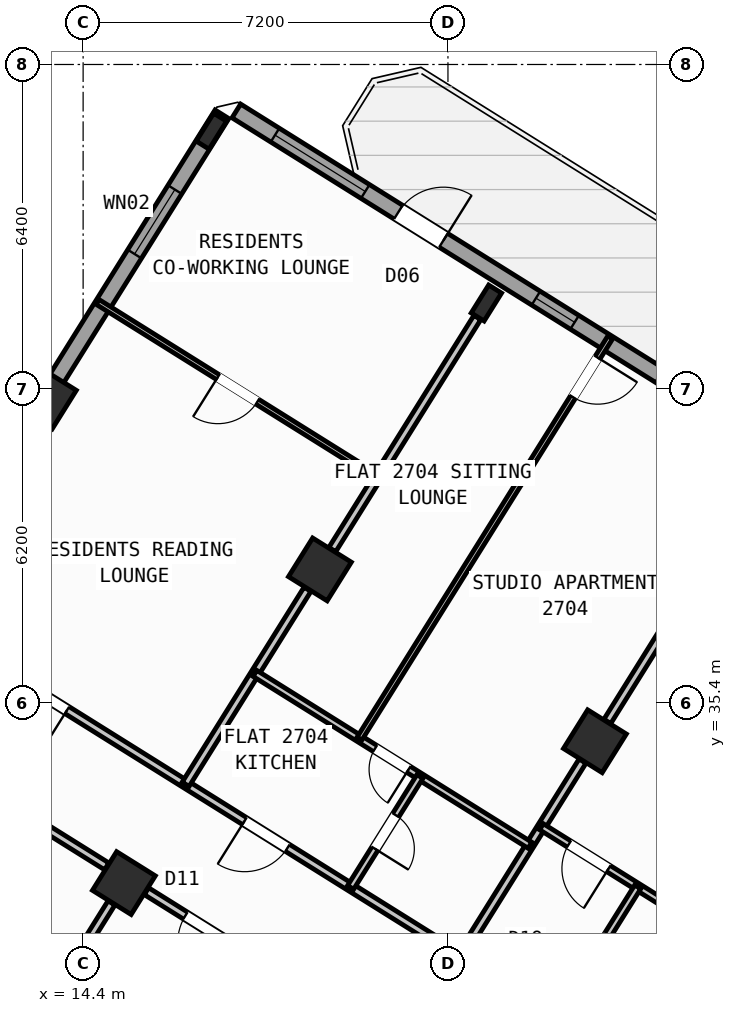
"""IFC4 building model, lengths in metres.
Left out: names, types, materials, properties, quantities, classifications, styles, units other than length and angle.
Written with IfcOpenShell. Run it as: python <this file> out.ifc"""

import sys

from ifc_helpers import new_model, si_unit, direction, frame, frame_2d, origin, origin_2d, place, context, subcontext, project, spatial, rectangle, hollow_rectangle, i_section, extrude, source, transform, mapped, element, fill, save


model = new_model("IFC4")
c1 = context("Model", 3, precision=1e-05, world=origin(), true_north=direction((0.0, 1.0)))
c2 = subcontext(c1, "Body", "Model", "MODEL_VIEW")
j1 = project(units=[si_unit("LENGTHUNIT", "METRE"), si_unit("PLANEANGLEUNIT", "RADIAN")], contexts=[c1])
p1 = place(None, origin())
s1 = spatial("IfcSite", under=j1, at=p1, CompositionType="ELEMENT")
p2 = place(p1, origin())
s2 = spatial("IfcBuilding", under=s1, at=p2, CompositionType="ELEMENT")
p3 = place(p2, frame((0.0, 0.0, 108.9)))
s3 = spatial("IfcBuildingStorey", under=s2, at=p3, CompositionType="ELEMENT", Elevation=108.9)
m1 = source(origin(), c2, "Body", "SweptSolid", [
    extrude(hollow_rectangle(XDim=0.9, YDim=0.9, WallThickness=0.036, at=origin_2d()), origin(), (0.0, 0.0, 1.0), 3.6),
])
p4 = place(p3, frame((24.5, 34.643, 0.0), z_axis=(0.0, 0.0, 1.0), x_axis=(-0.848048096156, 0.529919264233, 0.0)))
e1 = element("IfcColumn", 1, at=p4, inside=s3, PredefinedType="COLUMN", context=c2, shape_type="MappedRepresentation", body=[
    mapped(m1, transform((0.0, 0.0, 0.0), scale=1.0)),
])
m2 = source(origin(), c2, "Body", "SweptSolid", [
    extrude(i_section(OverallWidth=0.3, OverallDepth=0.65, WebThickness=0.016, FlangeThickness=0.031, at=origin_2d()), origin(), (0.0, 0.0, 1.0), 3.6),
])
p5 = place(p3, frame((22.358, 43.292, 0.0), z_axis=(0.0, 0.0, 1.0), x_axis=(-0.848048096156, 0.529919264233, 0.0)))
e2 = element("IfcColumn", 2, at=p5, inside=s3, PredefinedType="COLUMN", context=c2, shape_type="MappedRepresentation", body=[
    mapped(m2, transform((0.0, 0.0, 0.0), scale=1.0)),
])
for number, where, z_axis, x_axis in (
    (3, (19.073, 38.034, 0.0), (0.0, 0.0, 1.0), (-0.848, 0.53, 0.0)),
    (4, (15.205, 31.844, 0.0), (0.0, 0.0, 1.0), (-0.848, 0.53, 0.0)),
):
    element("IfcColumn", number, at=place(p3, frame(where, z_axis=z_axis, x_axis=x_axis)), inside=s3, PredefinedType="COLUMN", context=c2, shape_type="MappedRepresentation", body=[
        mapped(m1, transform((0.0, 0.0, 0.0), scale=1.0)),
    ])
p6 = place(p3, frame((16.931, 46.684, 0.0), z_axis=(0.0, 0.0, 1.0), x_axis=(-0.848048096156, 0.529919264233, 0.0)))
e5 = element("IfcColumn", 5, at=p6, inside=s3, PredefinedType="COLUMN", context=c2, shape_type="MappedRepresentation", body=[
    mapped(m2, transform((0.0, 0.0, 0.0), scale=1.0)),
])
p7 = place(p3, frame((13.646, 41.426, 0.0), z_axis=(0.0, 0.0, 1.0), x_axis=(-0.848048096156, 0.529919264233, 0.0)))
e6 = element("IfcColumn", 6, at=p7, inside=s3, PredefinedType="COLUMN", context=c2, shape_type="MappedRepresentation", body=[
    mapped(m1, transform((0.0, 0.0, 0.0), scale=1.0)),
])
p8 = place(p3, frame((5.7, 28.71, 0.0), z_axis=(0.0, 0.0, 1.0), x_axis=(0.529923711467, 0.8480453172, 0.0)))
e7 = element("IfcWall", 7, at=p8, inside=s3, PredefinedType="STANDARD", context=c2, shape_type="SweptSolid", body=[
    extrude(rectangle(XDim=21.587, YDim=0.32, at=frame_2d((10.794, 0.0))), origin(), (0.0, 0.0, 1.0), 2.775),
])
p9 = place(p8, frame((1.984, 0.0, 0.8)))
e8 = element("IfcOpeningElement", 8, at=p9, cuts=e7, PredefinedType="OPENING", context=c2, shape_type="SweptSolid", body=[
    extrude(rectangle(XDim=2.1, YDim=1.55, at=frame_2d((1.05, 0.775))), frame((0.0, 0.17, 0.0), z_axis=(0.0, -1.0, 0.0), x_axis=(1.0, 0.0, 0.0)), (0.0, 0.0, 1.0), 0.34),
])
p10 = place(p8, frame((11.459, 0.0, 0.85)))
e9 = element("IfcOpeningElement", 9, at=p10, cuts=e7, PredefinedType="OPENING", context=c2, shape_type="SweptSolid", body=[
    extrude(rectangle(XDim=1.8, YDim=1.5, at=frame_2d((0.9, 0.75))), frame((0.0, 0.17, 0.0), z_axis=(0.0, -1.0, 0.0), x_axis=(1.0, 0.0, 0.0)), (0.0, 0.0, 1.0), 0.34),
])
p11 = place(p8, frame((18.335, 0.0, 0.85)))
e10 = element("IfcOpeningElement", 10, at=p11, cuts=e7, PredefinedType="OPENING", context=c2, shape_type="SweptSolid", body=[
    extrude(rectangle(XDim=1.5, YDim=1.5, at=frame_2d((0.75, 0.75))), frame((0.0, 0.17, 0.0), z_axis=(0.0, -1.0, 0.0), x_axis=(1.0, 0.0, 0.0)), (0.0, 0.0, 1.0), 0.34),
])
p12 = place(p3, frame((17.424, 47.083, 0.0), z_axis=(0.0, 0.0, 1.0), x_axis=(0.848049927979, -0.529916332693, 0.0)))
e11 = element("IfcWall", 11, at=p12, inside=s3, PredefinedType="STANDARD", context=c2, shape_type="SweptSolid", body=[
    extrude(rectangle(XDim=29.223, YDim=0.32, at=frame_2d((14.612, 0.0))), origin(), (0.0, 0.0, 1.0), 3.35),
])
p13 = place(p12, frame((3.77, 0.0, 0.0)))
e12 = element("IfcOpeningElement", 12, at=p13, cuts=e11, PredefinedType="OPENING", context=c2, shape_type="SweptSolid", body=[
    extrude(rectangle(XDim=1.05, YDim=2.15, at=frame_2d((0.525, 1.075))), frame((0.0, 0.17, 0.0), z_axis=(0.0, -1.0, 0.0), x_axis=(1.0, 0.0, 0.0)), (0.0, 0.0, 1.0), 0.34),
])
p14 = place(p12, frame((0.9, 0.0, 0.8)))
e13 = element("IfcOpeningElement", 13, at=p14, cuts=e11, PredefinedType="OPENING", context=c2, shape_type="SweptSolid", body=[
    extrude(rectangle(XDim=2.1, YDim=1.55, at=frame_2d((1.05, 0.775))), frame((0.0, 0.17, 0.0), z_axis=(0.0, -1.0, 0.0), x_axis=(1.0, 0.0, 0.0)), (0.0, 0.0, 1.0), 0.34),
])
p15 = place(p12, frame((6.972, 0.0, 1.0)))
e14 = element("IfcOpeningElement", 14, at=p15, cuts=e11, PredefinedType="OPENING", context=c2, shape_type="SweptSolid", body=[
    extrude(rectangle(XDim=0.9, YDim=1.25, at=frame_2d((0.45, 0.625))), frame((0.0, 0.17, 0.0), z_axis=(0.0, -1.0, 0.0), x_axis=(1.0, 0.0, 0.0)), (0.0, 0.0, 1.0), 0.34),
])
p16 = place(p12, frame((9.847, 0.0, 0.85)))
e15 = element("IfcOpeningElement", 15, at=p16, cuts=e11, PredefinedType="OPENING", context=c2, shape_type="SweptSolid", body=[
    extrude(rectangle(XDim=1.5, YDim=1.5, at=frame_2d((0.75, 0.75))), frame((0.0, 0.17, 0.0), z_axis=(0.0, -1.0, 0.0), x_axis=(1.0, 0.0, 0.0)), (0.0, 0.0, 1.0), 0.34),
])
p17 = place(p12, frame((13.889, 0.0, 0.95)))
e16 = element("IfcOpeningElement", 16, at=p17, cuts=e11, PredefinedType="OPENING", context=c2, shape_type="SweptSolid", body=[
    extrude(rectangle(XDim=1.2, YDim=1.4, at=frame_2d((0.6, 0.7))), frame((0.0, 0.17, 0.0), z_axis=(0.0, -1.0, 0.0), x_axis=(1.0, 0.0, 0.0)), (0.0, 0.0, 1.0), 0.34),
])
p18 = place(p12, frame((17.254, 0.0, 1.0)))
e17 = element("IfcOpeningElement", 17, at=p18, cuts=e11, PredefinedType="OPENING", context=c2, shape_type="SweptSolid", body=[
    extrude(rectangle(XDim=0.9, YDim=1.25, at=frame_2d((0.45, 0.625))), frame((0.0, 0.17, 0.0), z_axis=(0.0, -1.0, 0.0), x_axis=(1.0, 0.0, 0.0)), (0.0, 0.0, 1.0), 0.34),
])
p19 = place(p12, frame((20.764, 0.0, 0.8)))
e18 = element("IfcOpeningElement", 18, at=p19, cuts=e11, PredefinedType="OPENING", context=c2, shape_type="SweptSolid", body=[
    extrude(rectangle(XDim=2.1, YDim=1.55, at=frame_2d((1.05, 0.775))), frame((0.0, 0.17, 0.0), z_axis=(0.0, -1.0, 0.0), x_axis=(1.0, 0.0, 0.0)), (0.0, 0.0, 1.0), 0.34),
])
p20 = place(p12, frame((25.403, 0.0, 0.8)))
e19 = element("IfcOpeningElement", 19, at=p20, cuts=e11, PredefinedType="OPENING", context=c2, shape_type="SweptSolid", body=[
    extrude(rectangle(XDim=2.1, YDim=1.55, at=frame_2d((1.05, 0.775))), frame((0.0, 0.17, 0.0), z_axis=(0.0, -1.0, 0.0), x_axis=(1.0, 0.0, 0.0)), (0.0, 0.0, 1.0), 0.34),
])
p21 = place(p3, frame((31.239, 38.274, 0.0), z_axis=(0.0, 0.0, 1.0), x_axis=(-0.529925472745, -0.848044216616, 0.0)))
e20 = element("IfcWall", 20, at=p21, inside=s3, PredefinedType="PARTITIONING", context=c2, shape_type="SweptSolid", body=[
    extrude(rectangle(XDim=11.65, YDim=0.16, at=frame_2d((5.825, 0.0))), origin(), (0.0, 0.0, 1.0), 3.34),
])
p22 = place(p3, frame((25.065, 28.394, 0.0), z_axis=(0.0, 0.0, 1.0), x_axis=(-0.848048310262, 0.529918921593, 0.0)))
e21 = element("IfcWall", 21, at=p22, inside=s3, PredefinedType="PARTITIONING", context=c2, shape_type="SweptSolid", body=[
    extrude(rectangle(XDim=16.73, YDim=0.16, at=frame_2d((8.365, 0.0))), origin(), (0.0, 0.0, 1.0), 3.34),
])
p23 = place(p22, frame((2.22, 0.0, 0.0)))
e22 = element("IfcOpeningElement", 22, at=p23, cuts=e21, PredefinedType="OPENING", context=c2, shape_type="SweptSolid", body=[
    extrude(rectangle(XDim=0.86, YDim=2.05, at=frame_2d((0.43, 1.025))), frame((0.0, 0.09, 0.0), z_axis=(0.0, -1.0, 0.0), x_axis=(1.0, 0.0, 0.0)), (0.0, 0.0, 1.0), 0.18),
])
p24 = place(p22, frame((7.82, 0.0, 0.0)))
e23 = element("IfcOpeningElement", 23, at=p24, cuts=e21, PredefinedType="OPENING", context=c2, shape_type="SweptSolid", body=[
    extrude(rectangle(XDim=1.0, YDim=2.1, at=frame_2d((0.5, 1.05))), frame((0.0, 0.09, 0.0), z_axis=(0.0, -1.0, 0.0), x_axis=(1.0, 0.0, 0.0)), (0.0, 0.0, 1.0), 0.18),
])
p25 = place(p22, frame((12.95, 0.0, 0.0)))
e24 = element("IfcOpeningElement", 24, at=p25, cuts=e21, PredefinedType="OPENING", context=c2, shape_type="SweptSolid", body=[
    extrude(rectangle(XDim=1.0, YDim=2.1, at=frame_2d((0.5, 1.05))), frame((0.0, 0.09, 0.0), z_axis=(0.0, -1.0, 0.0), x_axis=(1.0, 0.0, 0.0)), (0.0, 0.0, 1.0), 0.18),
])
p26 = place(p3, frame((20.293, 28.782, 0.0), z_axis=(0.0, 0.0, 1.0), x_axis=(-0.848040881926, 0.529930809241, 0.0)))
e25 = element("IfcWall", 25, at=p26, inside=s3, PredefinedType="PARTITIONING", context=c2, shape_type="SweptSolid", body=[
    extrude(rectangle(XDim=5.476, YDim=0.16, at=frame_2d((2.738, 0.0))), origin(), (0.0, 0.0, 1.0), 2.775),
])
p27 = place(p26, frame((3.568, 0.0, 0.0)))
e26 = element("IfcOpeningElement", 26, at=p27, cuts=e25, PredefinedType="OPENING", context=c2, shape_type="SweptSolid", body=[
    extrude(rectangle(XDim=1.0, YDim=2.1, at=frame_2d((0.5, 1.05))), frame((0.0, 0.09, 0.0), z_axis=(0.0, -1.0, 0.0), x_axis=(1.0, 0.0, 0.0)), (0.0, 0.0, 1.0), 0.18),
])
p28 = place(p3, frame((14.866, 32.173, 0.0), z_axis=(0.0, 0.0, 1.0), x_axis=(-0.848053401719, 0.529910773464, 0.0)))
e27 = element("IfcWall", 27, at=p28, inside=s3, PredefinedType="PARTITIONING", context=c2, shape_type="SweptSolid", body=[
    extrude(rectangle(XDim=5.476, YDim=0.16, at=frame_2d((2.738, 0.0))), origin(), (0.0, 0.0, 1.0), 2.775),
])
p29 = place(p28, frame((4.108, 0.0, 0.0)))
e28 = element("IfcOpeningElement", 28, at=p29, cuts=e27, PredefinedType="OPENING", context=c2, shape_type="SweptSolid", body=[
    extrude(rectangle(XDim=1.0, YDim=2.1, at=frame_2d((0.5, 1.05))), frame((0.0, 0.09, 0.0), z_axis=(0.0, -1.0, 0.0), x_axis=(1.0, 0.0, 0.0)), (0.0, 0.0, 1.0), 0.18),
])
p30 = place(p3, frame((14.96, 31.452, 0.0), z_axis=(0.0, 0.0, 1.0), x_axis=(-0.529947310719, -0.848030570122, 0.0)))
e29 = element("IfcWall", 29, at=p30, inside=s3, PredefinedType="PARTITIONING", context=c2, shape_type="SweptSolid", body=[
    extrude(rectangle(XDim=6.376, YDim=0.16, at=frame_2d((3.188, 0.0))), origin(), (0.0, 0.0, 1.0), 2.775),
])
p31 = place(p3, frame((13.986, 29.893, 0.0), z_axis=(0.0, 0.0, 1.0), x_axis=(-0.848051346257, 0.52991406295, 0.0)))
e30 = element("IfcWall", 30, at=p31, inside=s3, PredefinedType="PLUMBINGWALL", context=c2, shape_type="SweptSolid", body=[
    extrude(rectangle(XDim=3.62, YDim=0.14, at=frame_2d((1.81, 0.0))), origin(), (0.0, 0.0, 1.0), 3.34),
])
p32 = place(p3, frame((27.607, 39.615, 0.0), z_axis=(0.0, 0.0, 1.0), x_axis=(-0.529913610495, -0.848051628978, 0.0)))
e31 = element("IfcWall", 31, at=p32, inside=s3, PredefinedType="PARTITIONING", context=c2, shape_type="SweptSolid", body=[
    extrude(rectangle(XDim=5.401, YDim=0.16, at=frame_2d((2.7, 0.0))), origin(), (0.0, 0.0, 1.0), 2.775),
])
p33 = place(p3, frame((24.256, 34.251, 0.0), z_axis=(0.0, 0.0, 1.0), x_axis=(-0.529926399231, -0.848043637673, 0.0)))
e32 = element("IfcWall", 32, at=p33, inside=s3, PredefinedType="PARTITIONING", context=c2, shape_type="SweptSolid", body=[
    extrude(rectangle(XDim=4.538, YDim=0.16, at=frame_2d((2.269, 0.0))), origin(), (0.0, 0.0, 1.0), 2.775),
])
p34 = place(p3, frame((26.66, 30.947, 0.0), z_axis=(0.0, 0.0, 1.0), x_axis=(-0.84803087207, 0.529946827537, 0.0)))
e33 = element("IfcWall", 33, at=p34, inside=s3, PredefinedType="PLUMBINGWALL", context=c2, shape_type="SweptSolid", body=[
    extrude(rectangle(XDim=3.79, YDim=0.14, at=frame_2d((1.895, 0.0))), origin(), (0.0, 0.0, 1.0), 3.34),
])
p35 = place(p34, frame((2.23, 0.0, 0.0)))
e34 = element("IfcOpeningElement", 34, at=p35, cuts=e33, PredefinedType="OPENING", context=c2, shape_type="SweptSolid", body=[
    extrude(rectangle(XDim=0.92, YDim=2.08, at=frame_2d((0.46, 1.04))), frame((0.0, 0.08, 0.0), z_axis=(0.0, -1.0, 0.0), x_axis=(1.0, 0.0, 0.0)), (0.0, 0.0, 1.0), 0.16),
])
p36 = place(p3, frame((25.345, 31.768, 0.0), z_axis=(0.0, 0.0, 1.0), x_axis=(-0.529882284462, -0.848071202561, 0.0)))
e35 = element("IfcWall", 35, at=p36, inside=s3, PredefinedType="PLUMBINGWALL", context=c2, shape_type="SweptSolid", body=[
    extrude(rectangle(XDim=3.01, YDim=0.14, at=frame_2d((1.505, 0.0))), origin(), (0.0, 0.0, 1.0), 2.995),
])
p37 = place(p36, frame((1.115, 0.0, 0.0)))
e36 = element("IfcOpeningElement", 36, at=p37, cuts=e35, PredefinedType="OPENING", context=c2, shape_type="SweptSolid", body=[
    extrude(rectangle(XDim=0.78, YDim=2.05, at=frame_2d((0.39, 1.025))), frame((0.0, 0.08, 0.0), z_axis=(0.0, -1.0, 0.0), x_axis=(1.0, 0.0, 0.0)), (0.0, 0.0, 1.0), 0.16),
])
p38 = place(p3, frame((22.18, 43.006, 0.0), z_axis=(0.0, 0.0, 1.0), x_axis=(-0.529913610495, -0.848051628978, 0.0)))
e37 = element("IfcWall", 37, at=p38, inside=s3, PredefinedType="PARTITIONING", context=c2, shape_type="SweptSolid", body=[
    extrude(rectangle(XDim=5.401, YDim=0.16, at=frame_2d((2.7, 0.0))), origin(), (0.0, 0.0, 1.0), 2.775),
])
p39 = place(p3, frame((18.828, 37.643, 0.0), z_axis=(0.0, 0.0, 1.0), x_axis=(-0.529926399231, -0.848043637673, 0.0)))
e38 = element("IfcWall", 38, at=p39, inside=s3, PredefinedType="PARTITIONING", context=c2, shape_type="SweptSolid", body=[
    extrude(rectangle(XDim=4.538, YDim=0.16, at=frame_2d((2.269, 0.0))), origin(), (0.0, 0.0, 1.0), 2.775),
])
p40 = place(p3, frame((23.218, 32.591, 0.0), z_axis=(0.0, 0.0, 1.0), x_axis=(-0.848056163074, 0.529906354247, 0.0)))
e39 = element("IfcWall", 39, at=p40, inside=s3, PredefinedType="PLUMBINGWALL", context=c2, shape_type="SweptSolid", body=[
    extrude(rectangle(XDim=6.4, YDim=0.14, at=frame_2d((3.2, 0.0))), origin(), (0.0, 0.0, 1.0), 3.34),
])
p41 = place(p40, frame((2.824, 0.0, 0.0)))
e40 = element("IfcOpeningElement", 40, at=p41, cuts=e39, PredefinedType="OPENING", context=c2, shape_type="SweptSolid", body=[
    extrude(rectangle(XDim=0.78, YDim=2.05, at=frame_2d((0.39, 1.025))), frame((0.0, 0.08, 0.0), z_axis=(0.0, -1.0, 0.0), x_axis=(1.0, 0.0, 0.0)), (0.0, 0.0, 1.0), 0.16),
])
p42 = place(p3, frame((21.047, 33.947, 0.0), z_axis=(0.0, 0.0, 1.0), x_axis=(-0.529913878929, -0.848051461244, 0.0)))
e41 = element("IfcWall", 41, at=p42, inside=s3, PredefinedType="PLUMBINGWALL", context=c2, shape_type="SweptSolid", body=[
    extrude(rectangle(XDim=2.58, YDim=0.14, at=frame_2d((1.29, 0.0))), origin(), (0.0, 0.0, 1.0), 3.34),
])
p43 = place(p42, frame((0.9, 0.0, 0.0)))
e42 = element("IfcOpeningElement", 42, at=p43, cuts=e41, PredefinedType="OPENING", context=c2, shape_type="SweptSolid", body=[
    extrude(rectangle(XDim=0.78, YDim=2.05, at=frame_2d((0.39, 1.025))), frame((0.0, 0.08, 0.0), z_axis=(0.0, -1.0, 0.0), x_axis=(1.0, 0.0, 0.0)), (0.0, 0.0, 1.0), 0.16),
])
p44 = place(p3, frame((24.802, 42.614, 0.0), z_axis=(0.0, 0.0, 1.0), x_axis=(-0.529926099889, -0.848043824727, 0.0)))
e43 = element("IfcWall", 43, at=p44, inside=s3, PredefinedType="PARTITIONING", context=c2, shape_type="SweptSolid", body=[
    extrude(rectangle(XDim=9.34, YDim=0.11, at=frame_2d((4.67, 0.0))), origin(), (0.0, 0.0, 1.0), 3.34),
])
p45 = place(p44, frame((0.47, 0.0, 0.0)))
e44 = element("IfcOpeningElement", 44, at=p45, cuts=e43, PredefinedType="OPENING", context=c2, shape_type="SweptSolid", body=[
    extrude(rectangle(XDim=0.92, YDim=2.08, at=frame_2d((0.46, 1.04))), frame((0.0, 0.065, 0.0), z_axis=(0.0, -1.0, 0.0), x_axis=(1.0, 0.0, 0.0)), (0.0, 0.0, 1.0), 0.13),
])
p46 = place(p3, frame((20.213, 39.859, 0.0), z_axis=(0.0, 0.0, 1.0), x_axis=(-0.848048787466, 0.529918157905, 0.0)))
e45 = element("IfcWall", 45, at=p46, inside=s3, PredefinedType="PARTITIONING", context=c2, shape_type="SweptSolid", body=[
    extrude(rectangle(XDim=6.52, YDim=0.11, at=frame_2d((3.26, 0.0))), origin(), (0.0, 0.0, 1.0), 3.34),
])
p47 = place(p46, frame((2.8, 0.0, 0.0)))
e46 = element("IfcOpeningElement", 46, at=p47, cuts=e45, PredefinedType="OPENING", context=c2, shape_type="SweptSolid", body=[
    extrude(rectangle(XDim=0.92, YDim=2.08, at=frame_2d((0.46, 1.04))), frame((0.0, 0.065, 0.0), z_axis=(0.0, -1.0, 0.0), x_axis=(1.0, 0.0, 0.0)), (0.0, 0.0, 1.0), 0.13),
])
m3 = source(origin(), c2, "Body", "SweptSolid", [
    extrude(rectangle(XDim=1.05, YDim=2.15, at=frame_2d((0.525, 1.075))), frame((0.0, 0.025, 0.0), z_axis=(0.0, -1.0, 0.0), x_axis=(1.0, 0.0, 0.0)), (0.0, 0.0, 1.0), 0.05),
])
p48 = place(p13, origin())
e47 = element("IfcDoor", 47, at=p48, inside=s3, OperationType="SINGLE_SWING_RIGHT", PredefinedType="DOOR", context=c2, shape_type="MappedRepresentation", body=[
    mapped(m3, transform((0.0, 0.0, 0.0), scale=1.0)),
])
fill(e12, e47)
m4 = source(origin(), c2, "Body", "SweptSolid", [
    extrude(rectangle(XDim=1.5, YDim=1.5, at=frame_2d((0.75, 0.75))), frame((0.0, 0.03, 0.0), z_axis=(0.0, -1.0, 0.0), x_axis=(1.0, 0.0, 0.0)), (0.0, 0.0, 1.0), 0.06),
])
p49 = place(p11, origin())
e48 = element("IfcWindow", 48, at=p49, inside=s3, PartitioningType="SINGLE_PANEL", PredefinedType="WINDOW", context=c2, shape_type="MappedRepresentation", body=[
    mapped(m4, transform((0.0, 0.0, 0.0), scale=1.0)),
])
fill(e10, e48)
m5 = source(origin(), c2, "Body", "SweptSolid", [
    extrude(rectangle(XDim=2.1, YDim=1.55, at=frame_2d((1.05, 0.775))), frame((0.0, 0.03, 0.0), z_axis=(0.0, -1.0, 0.0), x_axis=(1.0, 0.0, 0.0)), (0.0, 0.0, 1.0), 0.06),
])
p50 = place(p14, origin())
e49 = element("IfcWindow", 49, at=p50, inside=s3, PartitioningType="SINGLE_PANEL", PredefinedType="WINDOW", context=c2, shape_type="MappedRepresentation", body=[
    mapped(m5, transform((0.0, 0.0, 0.0), scale=1.0)),
])
fill(e13, e49)
m6 = source(origin(), c2, "Body", "SweptSolid", [
    extrude(rectangle(XDim=0.9, YDim=1.25, at=frame_2d((0.45, 0.625))), frame((0.0, 0.03, 0.0), z_axis=(0.0, -1.0, 0.0), x_axis=(1.0, 0.0, 0.0)), (0.0, 0.0, 1.0), 0.06),
])
p51 = place(p15, origin())
e50 = element("IfcWindow", 50, at=p51, inside=s3, PartitioningType="SINGLE_PANEL", PredefinedType="WINDOW", context=c2, shape_type="MappedRepresentation", body=[
    mapped(m6, transform((0.0, 0.0, 0.0), scale=1.0)),
])
fill(e14, e50)
m7 = source(origin(), c2, "Body", "SweptSolid", [
    extrude(rectangle(XDim=1.0, YDim=2.1, at=frame_2d((0.5, 1.05))), frame((0.0, 0.025, 0.0), z_axis=(0.0, -1.0, 0.0), x_axis=(1.0, 0.0, 0.0)), (0.0, 0.0, 1.0), 0.05),
])
p52 = place(p27, origin())
e51 = element("IfcDoor", 51, at=p52, inside=s3, OperationType="SINGLE_SWING_LEFT", PredefinedType="DOOR", context=c2, shape_type="MappedRepresentation", body=[
    mapped(m7, transform((0.0, 0.0, 0.0), scale=1.0)),
])
fill(e26, e51)
m8 = source(origin(), c2, "Body", "SweptSolid", [
    extrude(rectangle(XDim=0.92, YDim=2.08, at=frame_2d((0.46, 1.04))), frame((0.0, 0.025, 0.0), z_axis=(0.0, -1.0, 0.0), x_axis=(1.0, 0.0, 0.0)), (0.0, 0.0, 1.0), 0.05),
])
p53 = place(p35, origin())
e52 = element("IfcDoor", 52, at=p53, inside=s3, OperationType="SINGLE_SWING_LEFT", PredefinedType="DOOR", context=c2, shape_type="MappedRepresentation", body=[
    mapped(m8, transform((0.0, 0.0, 0.0), scale=1.0)),
])
fill(e34, e52)
p54 = place(p45, origin())
e53 = element("IfcDoor", 53, at=p54, inside=s3, OperationType="SINGLE_SWING_LEFT", PredefinedType="DOOR", context=c2, shape_type="MappedRepresentation", body=[
    mapped(m8, transform((0.0, 0.0, 0.0), scale=1.0)),
])
fill(e44, e53)
p55 = place(p24, origin())
e54 = element("IfcDoor", 54, at=p55, inside=s3, OperationType="SINGLE_SWING_RIGHT", PredefinedType="DOOR", context=c2, shape_type="MappedRepresentation", body=[
    mapped(m7, transform((0.0, 0.0, 0.0), scale=1.0)),
])
fill(e23, e54)
m9 = source(origin(), c2, "Body", "SweptSolid", [
    extrude(rectangle(XDim=0.78, YDim=2.05, at=frame_2d((0.39, 1.025))), frame((0.0, 0.025, 0.0), z_axis=(0.0, -1.0, 0.0), x_axis=(1.0, 0.0, 0.0)), (0.0, 0.0, 1.0), 0.05),
])
p56 = place(p41, origin())
e55 = element("IfcDoor", 55, at=p56, inside=s3, OperationType="SINGLE_SWING_LEFT", PredefinedType="DOOR", context=c2, shape_type="MappedRepresentation", body=[
    mapped(m9, transform((0.0, 0.0, 0.0), scale=1.0)),
])
fill(e40, e55)
p57 = place(p43, origin())
e56 = element("IfcDoor", 56, at=p57, inside=s3, OperationType="SINGLE_SWING_RIGHT", PredefinedType="DOOR", context=c2, shape_type="MappedRepresentation", body=[
    mapped(m9, transform((0.0, 0.0, 0.0), scale=1.0)),
])
fill(e42, e56)
p58 = place(p25, origin())
e57 = element("IfcDoor", 57, at=p58, inside=s3, OperationType="SINGLE_SWING_LEFT", PredefinedType="DOOR", context=c2, shape_type="MappedRepresentation", body=[
    mapped(m7, transform((0.0, 0.0, 0.0), scale=1.0)),
])
fill(e24, e57)
p59 = place(p47, origin())
e58 = element("IfcDoor", 58, at=p59, inside=s3, OperationType="SINGLE_SWING_RIGHT", PredefinedType="DOOR", context=c2, shape_type="MappedRepresentation", body=[
    mapped(m8, transform((0.0, 0.0, 0.0), scale=1.0)),
])
fill(e46, e58)
save(model, sys.argv[1])
